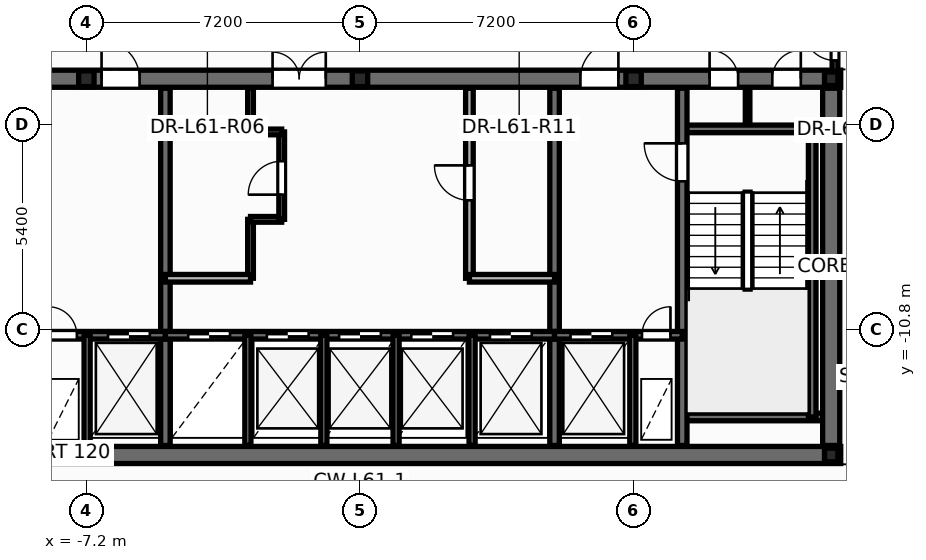
"""IFC4 building model, lengths in metres.
Left out: names, types, materials, properties, quantities, classifications, styles, units other than length and angle.
Written with IfcOpenShell. Run it as: python <this file> out.ifc"""

import sys

from ifc_helpers import new_model, si_unit, direction, frame, frame_2d, origin, origin_2d, place, context, subcontext, project, spatial, rectangle, i_section, extrude, element, fill, save


model = new_model("IFC4")
c1 = context("Model", 3, precision=1e-05, world=origin(), true_north=direction((0.0, 1.0)))
c2 = subcontext(c1, "Body", "Model", "MODEL_VIEW")
j1 = project(units=[si_unit("LENGTHUNIT", "METRE"), si_unit("PLANEANGLEUNIT", "RADIAN")], contexts=[c1])
p1 = place(None, origin())
s1 = spatial("IfcSite", under=j1, at=p1, CompositionType="ELEMENT")
p2 = place(p1, origin())
s2 = spatial("IfcBuilding", under=s1, at=p2, CompositionType="ELEMENT")
p3 = place(p2, frame((0.0, 0.0, 233.4)))
s3 = spatial("IfcBuildingStorey", under=s2, at=p3, CompositionType="ELEMENT", Elevation=233.4)
for number, where, z_axis, x_axis in (
    (1, (12.4, -14.1, 0.0), (0.0, 0.0, 1.0), (1.0, 0.0, 0.0)),
    (2, (12.4, -4.2, 0.0), (0.0, 0.0, 1.0), (1.0, 0.0, 0.0)),
):
    element("IfcColumn", number, at=place(p3, frame(where, z_axis=z_axis, x_axis=x_axis)), inside=s3, PredefinedType="COLUMN", context=c2, shape_type="SweptSolid", body=[
        extrude(i_section(OverallWidth=0.352, OverallDepth=0.359, WebThickness=0.018, FlangeThickness=0.026, at=origin_2d()), origin(), (0.0, 0.0, 1.0), 3.6),
    ])
for number, where, z_axis, x_axis in (
    (3, (-7.2, -4.2, 0.0), (0.0, 0.0, 1.0), (1.0, 0.0, 0.0)),
    (4, (0.0, -4.2, 0.0), (0.0, 0.0, 1.0), (1.0, 0.0, 0.0)),
    (5, (7.2, -4.2, 0.0), (0.0, 0.0, 1.0), (1.0, 0.0, 0.0)),
):
    element("IfcColumn", number, at=place(p3, frame(where, z_axis=z_axis, x_axis=x_axis)), inside=s3, PredefinedType="PILASTER", context=c2, shape_type="SweptSolid", body=[
        extrude(i_section(OverallWidth=0.405, OverallDepth=0.414, WebThickness=0.022, FlangeThickness=0.032, at=origin_2d()), origin(), (0.0, 0.0, 1.0), 3.6),
    ])
p4 = place(p3, frame((-2.88, -9.45, 0.0), z_axis=(0.0, 0.0, 1.0), x_axis=(0.0, 1.0, 0.0)))
e6 = element("IfcWall", 6, at=p4, inside=s3, PredefinedType="PARTITIONING", context=c2, shape_type="SweptSolid", body=[
    extrude(rectangle(XDim=1.55, YDim=0.15, at=frame_2d((0.775, 0.0))), origin(), (0.0, 0.0, 1.0), 3.345),
])
p5 = place(p3, frame((-2.88, -7.9, 0.0), z_axis=(0.0, 0.0, 1.0), x_axis=(1.0, 0.0, 0.0)))
e7 = element("IfcWall", 7, at=p5, inside=s3, PredefinedType="PARTITIONING", context=c2, shape_type="SweptSolid", body=[
    extrude(rectangle(XDim=0.82, YDim=0.15, at=frame_2d((0.41, 0.0))), origin(), (0.0, 0.0, 1.0), 3.345),
])
p6 = place(p3, frame((-2.06, -7.9, 0.0), z_axis=(0.0, 0.0, 1.0), x_axis=(0.0, 1.0, 0.0)))
e8 = element("IfcWall", 8, at=p6, inside=s3, PredefinedType="PARTITIONING", context=c2, shape_type="SweptSolid", body=[
    extrude(rectangle(XDim=2.3, YDim=0.15, at=frame_2d((1.15, 0.0))), origin(), (0.0, 0.0, 1.0), 3.345),
])
p7 = place(p6, frame((0.65, 0.0, 0.0)))
e9 = element("IfcOpeningElement", 9, at=p7, cuts=e8, PredefinedType="OPENING", context=c2, shape_type="SweptSolid", body=[
    extrude(rectangle(XDim=0.886, YDim=2.104, at=frame_2d((0.44, 1.052))), frame((0.0, 0.085, 0.0), z_axis=(0.0, -1.0, 0.0), x_axis=(1.0, 0.0, 0.0)), (0.0, 0.0, 1.0), 0.17),
])
p8 = place(p3, frame((-2.88, -5.6, 0.0), z_axis=(0.0, 0.0, 1.0), x_axis=(1.0, 0.0, 0.0)))
e10 = element("IfcWall", 10, at=p8, inside=s3, PredefinedType="PARTITIONING", context=c2, shape_type="SweptSolid", body=[
    extrude(rectangle(XDim=0.82, YDim=0.15, at=frame_2d((0.41, 0.0))), origin(), (0.0, 0.0, 1.0), 3.345),
])
p9 = place(p3, frame((-2.88, -5.6, 0.0), z_axis=(0.0, 0.0, 1.0), x_axis=(0.0, 1.0, 0.0)))
e11 = element("IfcWall", 11, at=p9, inside=s3, PredefinedType="PARTITIONING", context=c2, shape_type="SweptSolid", body=[
    extrude(rectangle(XDim=1.15, YDim=0.15, at=frame_2d((0.575, 0.0))), origin(), (0.0, 0.0, 1.0), 3.345),
])
p10 = place(p3, frame((10.2, -5.52, 0.0), z_axis=(0.0, 0.0, 1.0), x_axis=(0.0, 1.0, 0.0)))
e12 = element("IfcWall", 12, at=p10, inside=s3, PredefinedType="PARTITIONING", context=c2, shape_type="SweptSolid", body=[
    extrude(rectangle(XDim=1.12, YDim=0.12, at=frame_2d((0.56, 0.0))), origin(), (0.0, 0.0, 1.0), 3.345),
])
p11 = place(p3, frame((-12.65, -14.1, 0.0), z_axis=(0.0, 0.0, 1.0), x_axis=(1.0, 0.0, 0.0)))
e13 = element("IfcWall", 13, at=p11, inside=s3, PredefinedType="SHEAR", context=c2, shape_type="SweptSolid", body=[
    extrude(rectangle(XDim=25.3, YDim=0.45, at=frame_2d((12.65, 0.0))), origin(), (0.0, 0.0, 1.0), 3.6),
])
p12 = place(p3, frame((-12.65, -4.2, 0.0), z_axis=(0.0, 0.0, 1.0), x_axis=(1.0, 0.0, 0.0)))
e14 = element("IfcWall", 14, at=p12, inside=s3, PredefinedType="SHEAR", context=c2, shape_type="SweptSolid", body=[
    extrude(rectangle(XDim=25.3, YDim=0.45, at=frame_2d((12.65, 0.0))), origin(), (0.0, 0.0, 1.0), 3.6),
])
p13 = place(p12, frame((1.85, 0.0, 0.0)))
e15 = element("IfcOpeningElement", 15, at=p13, cuts=e14, PredefinedType="OPENING", context=c2, shape_type="SweptSolid", body=[
    extrude(rectangle(XDim=0.756, YDim=2.054, at=frame_2d((0.375, 1.027))), frame((0.0, 0.235, 0.0), z_axis=(0.0, -1.0, 0.0), x_axis=(1.0, 0.0, 0.0)), (0.0, 0.0, 1.0), 0.47),
])
p14 = place(p12, frame((21.85, 0.0, 0.0)))
e16 = element("IfcOpeningElement", 16, at=p14, cuts=e14, PredefinedType="OPENING", context=c2, shape_type="SweptSolid", body=[
    extrude(rectangle(XDim=0.756, YDim=2.054, at=frame_2d((0.375, 1.027))), frame((0.0, 0.235, 0.0), z_axis=(0.0, -1.0, 0.0), x_axis=(1.0, 0.0, 0.0)), (0.0, 0.0, 1.0), 0.47),
])
p15 = place(p12, frame((23.5, 0.0, 0.0)))
e17 = element("IfcOpeningElement", 17, at=p15, cuts=e14, PredefinedType="OPENING", context=c2, shape_type="SweptSolid", body=[
    extrude(rectangle(XDim=0.756, YDim=2.054, at=frame_2d((0.375, 1.027))), frame((0.0, 0.235, 0.0), z_axis=(0.0, -1.0, 0.0), x_axis=(1.0, 0.0, 0.0)), (0.0, 0.0, 1.0), 0.47),
])
p16 = place(p12, frame((5.85, 0.0, 0.0)))
e18 = element("IfcOpeningElement", 18, at=p16, cuts=e14, PredefinedType="OPENING", context=c2, shape_type="SweptSolid", body=[
    extrude(rectangle(XDim=1.006, YDim=2.104, at=frame_2d((0.5, 1.052))), frame((0.0, 0.235, 0.0), z_axis=(0.0, -1.0, 0.0), x_axis=(1.0, 0.0, 0.0)), (0.0, 0.0, 1.0), 0.47),
])
p17 = place(p12, frame((10.35, 0.0, 0.0)))
e19 = element("IfcOpeningElement", 19, at=p17, cuts=e14, PredefinedType="OPENING", context=c2, shape_type="SweptSolid", body=[
    extrude(rectangle(XDim=1.406, YDim=2.154, at=frame_2d((0.7, 1.077))), frame((0.0, 0.235, 0.0), z_axis=(0.0, -1.0, 0.0), x_axis=(1.0, 0.0, 0.0)), (0.0, 0.0, 1.0), 0.47),
])
p18 = place(p12, frame((18.45, 0.0, 0.0)))
e20 = element("IfcOpeningElement", 20, at=p18, cuts=e14, PredefinedType="OPENING", context=c2, shape_type="SweptSolid", body=[
    extrude(rectangle(XDim=1.006, YDim=2.104, at=frame_2d((0.5, 1.052))), frame((0.0, 0.235, 0.0), z_axis=(0.0, -1.0, 0.0), x_axis=(1.0, 0.0, 0.0)), (0.0, 0.0, 1.0), 0.47),
])
for number, where, z_axis, x_axis in (
    (21, (8.48, -5.52, 0.0), (0.0, 0.0, 1.0), (1.0, 0.0, 0.0)),
    (22, (8.48, -13.1, 0.0), (0.0, 0.0, 1.0), (1.0, 0.0, 0.0)),
):
    element("IfcWall", number, at=place(p3, frame(where, z_axis=z_axis, x_axis=x_axis)), inside=s3, PredefinedType="SOLIDWALL", context=c2, shape_type="SweptSolid", body=[
        extrude(rectangle(XDim=3.87, YDim=0.2, at=frame_2d((1.935, 0.0))), origin(), (0.0, 0.0, 1.0), 3.6),
    ])
p19 = place(p3, frame((11.9, -13.1, 0.0), z_axis=(0.0, 0.0, 1.0), x_axis=(0.0, 1.0, 0.0)))
e23 = element("IfcWall", 23, at=p19, inside=s3, PredefinedType="SOLIDWALL", context=c2, shape_type="SweptSolid", body=[
    extrude(rectangle(XDim=7.58, YDim=0.2, at=frame_2d((3.79, 0.0))), origin(), (0.0, 0.0, 1.0), 3.6),
])
p20 = place(p3, frame((8.48, -13.85, 0.0), z_axis=(0.0, 0.0, 1.0), x_axis=(0.0, 1.0, 0.0)))
e24 = element("IfcWall", 24, at=p20, inside=s3, PredefinedType="SHEAR", context=c2, shape_type="SweptSolid", body=[
    extrude(rectangle(XDim=9.4, YDim=0.25, at=frame_2d((4.7, 0.0))), origin(), (0.0, 0.0, 1.0), 3.6),
])
p21 = place(p20, frame((6.95, 0.0, 0.0)))
e25 = element("IfcOpeningElement", 25, at=p21, cuts=e24, PredefinedType="OPENING", context=c2, shape_type="SweptSolid", body=[
    extrude(rectangle(XDim=1.006, YDim=2.104, at=frame_2d((0.5, 1.052))), frame((0.0, 0.135, 0.0), z_axis=(0.0, -1.0, 0.0), x_axis=(1.0, 0.0, 0.0)), (0.0, 0.0, 1.0), 0.27),
])
for number, where, z_axis, x_axis in (
    (26, (-5.12, -13.85, 0.0), (0.0, 0.0, 1.0), (0.0, 1.0, 0.0)),
    (27, (5.12, -13.85, 0.0), (0.0, 0.0, 1.0), (0.0, 1.0, 0.0)),
):
    element("IfcWall", number, at=place(p3, frame(where, z_axis=z_axis, x_axis=x_axis)), inside=s3, PredefinedType="SHEAR", context=c2, shape_type="SweptSolid", body=[
        extrude(rectangle(XDim=9.4, YDim=0.25, at=frame_2d((4.7, 0.0))), origin(), (0.0, 0.0, 1.0), 3.6),
    ])
p22 = place(p3, frame((-8.48, -10.95, 0.0), z_axis=(0.0, 0.0, 1.0), x_axis=(1.0, 0.0, 0.0)))
e28 = element("IfcWall", 28, at=p22, inside=s3, PredefinedType="SOLIDWALL", context=c2, shape_type="SweptSolid", body=[
    extrude(rectangle(XDim=3.36, YDim=0.2, at=frame_2d((1.68, 0.0))), origin(), (0.0, 0.0, 1.0), 3.6),
])
p23 = place(p22, frame((0.28, 0.0, 0.0)))
e29 = element("IfcOpeningElement", 29, at=p23, cuts=e28, PredefinedType="OPENING", context=c2, shape_type="SweptSolid", body=[
    extrude(rectangle(XDim=0.756, YDim=2.054, at=frame_2d((0.375, 1.027))), frame((0.0, 0.11, 0.0), z_axis=(0.0, -1.0, 0.0), x_axis=(1.0, 0.0, 0.0)), (0.0, 0.0, 1.0), 0.22),
])
p24 = place(p22, frame((1.85, 0.0, 0.0)))
e30 = element("IfcOpeningElement", 30, at=p24, cuts=e28, PredefinedType="OPENING", context=c2, shape_type="SweptSolid", body=[
    extrude(rectangle(XDim=1.106, YDim=2.104, at=frame_2d((0.55, 1.052))), frame((0.0, 0.11, 0.0), z_axis=(0.0, -1.0, 0.0), x_axis=(1.0, 0.0, 0.0)), (0.0, 0.0, 1.0), 0.22),
])
p25 = place(p3, frame((-5.12, -10.95, 0.0), z_axis=(0.0, 0.0, 1.0), x_axis=(1.0, 0.0, 0.0)))
e31 = element("IfcWall", 31, at=p25, inside=s3, PredefinedType="SOLIDWALL", context=c2, shape_type="SweptSolid", body=[
    extrude(rectangle(XDim=10.24, YDim=0.2, at=frame_2d((5.12, 0.0))), origin(), (0.0, 0.0, 1.0), 3.6),
])
p26 = place(p25, frame((0.6, 0.0, 0.0)))
e32 = element("IfcOpeningElement", 32, at=p26, cuts=e31, PredefinedType="OPENING", context=c2, shape_type="SweptSolid", body=[
    extrude(rectangle(XDim=1.106, YDim=2.104, at=frame_2d((0.55, 1.052))), frame((0.0, 0.11, 0.0), z_axis=(0.0, -1.0, 0.0), x_axis=(1.0, 0.0, 0.0)), (0.0, 0.0, 1.0), 0.22),
])
p27 = place(p25, frame((2.67, 0.0, 0.0)))
e33 = element("IfcOpeningElement", 33, at=p27, cuts=e31, PredefinedType="OPENING", context=c2, shape_type="SweptSolid", body=[
    extrude(rectangle(XDim=1.106, YDim=2.104, at=frame_2d((0.55, 1.052))), frame((0.0, 0.11, 0.0), z_axis=(0.0, -1.0, 0.0), x_axis=(1.0, 0.0, 0.0)), (0.0, 0.0, 1.0), 0.22),
])
p28 = place(p25, frame((4.57, 0.0, 0.0)))
e34 = element("IfcOpeningElement", 34, at=p28, cuts=e31, PredefinedType="OPENING", context=c2, shape_type="SweptSolid", body=[
    extrude(rectangle(XDim=1.106, YDim=2.104, at=frame_2d((0.55, 1.052))), frame((0.0, 0.11, 0.0), z_axis=(0.0, -1.0, 0.0), x_axis=(1.0, 0.0, 0.0)), (0.0, 0.0, 1.0), 0.22),
])
p29 = place(p25, frame((6.47, 0.0, 0.0)))
e35 = element("IfcOpeningElement", 35, at=p29, cuts=e31, PredefinedType="OPENING", context=c2, shape_type="SweptSolid", body=[
    extrude(rectangle(XDim=1.106, YDim=2.104, at=frame_2d((0.55, 1.052))), frame((0.0, 0.11, 0.0), z_axis=(0.0, -1.0, 0.0), x_axis=(1.0, 0.0, 0.0)), (0.0, 0.0, 1.0), 0.22),
])
p30 = place(p25, frame((8.54, 0.0, 0.0)))
e36 = element("IfcOpeningElement", 36, at=p30, cuts=e31, PredefinedType="OPENING", context=c2, shape_type="SweptSolid", body=[
    extrude(rectangle(XDim=1.106, YDim=2.104, at=frame_2d((0.55, 1.052))), frame((0.0, 0.11, 0.0), z_axis=(0.0, -1.0, 0.0), x_axis=(1.0, 0.0, 0.0)), (0.0, 0.0, 1.0), 0.22),
])
p31 = place(p3, frame((5.12, -10.95, 0.0), z_axis=(0.0, 0.0, 1.0), x_axis=(1.0, 0.0, 0.0)))
e37 = element("IfcWall", 37, at=p31, inside=s3, PredefinedType="SOLIDWALL", context=c2, shape_type="SweptSolid", body=[
    extrude(rectangle(XDim=3.36, YDim=0.2, at=frame_2d((1.68, 0.0))), origin(), (0.0, 0.0, 1.0), 3.6),
])
p32 = place(p31, frame((0.42, 0.0, 0.0)))
e38 = element("IfcOpeningElement", 38, at=p32, cuts=e37, PredefinedType="OPENING", context=c2, shape_type="SweptSolid", body=[
    extrude(rectangle(XDim=1.106, YDim=2.104, at=frame_2d((0.55, 1.052))), frame((0.0, 0.11, 0.0), z_axis=(0.0, -1.0, 0.0), x_axis=(1.0, 0.0, 0.0)), (0.0, 0.0, 1.0), 0.22),
])
p33 = place(p31, frame((2.3, 0.0, 0.0)))
e39 = element("IfcOpeningElement", 39, at=p33, cuts=e37, PredefinedType="OPENING", context=c2, shape_type="SweptSolid", body=[
    extrude(rectangle(XDim=0.756, YDim=2.054, at=frame_2d((0.375, 1.027))), frame((0.0, 0.11, 0.0), z_axis=(0.0, -1.0, 0.0), x_axis=(1.0, 0.0, 0.0)), (0.0, 0.0, 1.0), 0.22),
])
for number, where, z_axis, x_axis in (
    (40, (-7.18, -13.85, 0.0), (0.0, 0.0, 1.0), (0.0, 1.0, 0.0)),
    (41, (7.18, -13.85, 0.0), (0.0, 0.0, 1.0), (0.0, 1.0, 0.0)),
    (42, (-2.95, -13.85, 0.0), (0.0, 0.0, 1.0), (0.0, 1.0, 0.0)),
    (43, (2.95, -13.85, 0.0), (0.0, 0.0, 1.0), (0.0, 1.0, 0.0)),
):
    element("IfcWall", number, at=place(p3, frame(where, z_axis=z_axis, x_axis=x_axis)), inside=s3, PredefinedType="PARTITIONING", context=c2, shape_type="SweptSolid", body=[
        extrude(rectangle(XDim=2.9, YDim=0.16, at=frame_2d((1.45, 0.0))), origin(), (0.0, 0.0, 1.0), 2.57),
    ])
p34 = place(p3, frame((12.4, -13.85, 0.0), z_axis=(0.0, 0.0, 1.0), x_axis=(0.0, 1.0, 0.0)))
e44 = element("IfcWall", 44, at=p34, inside=s3, PredefinedType="SHEAR", context=c2, shape_type="SweptSolid", body=[
    extrude(rectangle(XDim=9.4, YDim=0.45, at=frame_2d((4.7, 0.0))), origin(), (0.0, 0.0, 1.0), 3.6),
])
p35 = place(p3, frame((-5.12, -9.45, 0.0), z_axis=(0.0, 0.0, 1.0), x_axis=(1.0, 0.0, 0.0)))
e45 = element("IfcWall", 45, at=p35, inside=s3, PredefinedType="SOLIDWALL", context=c2, shape_type="SweptSolid", body=[
    extrude(rectangle(XDim=2.24, YDim=0.2, at=frame_2d((1.12, 0.0))), origin(), (0.0, 0.0, 1.0), 3.345),
])
p36 = place(p3, frame((2.88, -9.45, 0.0), z_axis=(0.0, 0.0, 1.0), x_axis=(0.0, 1.0, 0.0)))
e46 = element("IfcWall", 46, at=p36, inside=s3, PredefinedType="SOLIDWALL", context=c2, shape_type="SweptSolid", body=[
    extrude(rectangle(XDim=5.0, YDim=0.2, at=frame_2d((2.5, 0.0))), origin(), (0.0, 0.0, 1.0), 3.345),
])
p37 = place(p36, frame((2.05, 0.0, 0.0)))
e47 = element("IfcOpeningElement", 47, at=p37, cuts=e46, PredefinedType="OPENING", context=c2, shape_type="SweptSolid", body=[
    extrude(rectangle(XDim=0.926, YDim=2.104, at=frame_2d((0.46, 1.052))), frame((0.0, 0.11, 0.0), z_axis=(0.0, -1.0, 0.0), x_axis=(1.0, 0.0, 0.0)), (0.0, 0.0, 1.0), 0.22),
])
p38 = place(p3, frame((2.88, -9.45, 0.0), z_axis=(0.0, 0.0, 1.0), x_axis=(1.0, 0.0, 0.0)))
e48 = element("IfcWall", 48, at=p38, inside=s3, PredefinedType="SOLIDWALL", context=c2, shape_type="SweptSolid", body=[
    extrude(rectangle(XDim=2.24, YDim=0.2, at=frame_2d((1.12, 0.0))), origin(), (0.0, 0.0, 1.0), 3.345),
])
for number, where, z_axis, x_axis in (
    (49, (-0.95, -13.85, 0.0), (0.0, 0.0, 1.0), (0.0, 1.0, 0.0)),
    (50, (0.95, -13.85, 0.0), (0.0, 0.0, 1.0), (0.0, 1.0, 0.0)),
):
    element("IfcWall", number, at=place(p3, frame(where, z_axis=z_axis, x_axis=x_axis)), inside=s3, PredefinedType="PARTITIONING", context=c2, shape_type="SweptSolid", body=[
        extrude(rectangle(XDim=2.9, YDim=0.16, at=frame_2d((1.45, 0.0))), origin(), (0.0, 0.0, 1.0), 2.57),
    ])
p39 = place(p3, frame((12.5, -4.24, 0.0), z_axis=(0.0, 0.0, 1.0), x_axis=(0.0, 1.0, 0.0)))
e51 = element("IfcWall", 51, at=p39, inside=s3, PredefinedType="PARTITIONING", context=c2, shape_type="SweptSolid", body=[
    extrude(rectangle(XDim=1.48, YDim=0.15, at=frame_2d((0.74, 0.0))), origin(), (0.0, 0.0, 1.0), 2.32),
])
p40 = place(p39, frame((0.522, 0.0, 0.0)))
e52 = element("IfcOpeningElement", 52, at=p40, cuts=e51, PredefinedType="OPENING", context=c2, shape_type="SweptSolid", body=[
    extrude(rectangle(XDim=0.826, YDim=2.104, at=frame_2d((0.41, 1.052))), frame((0.0, 0.085, 0.0), z_axis=(0.0, -1.0, 0.0), x_axis=(1.0, 0.0, 0.0)), (0.0, 0.0, 1.0), 0.17),
])
p41 = place(p7, origin())
e53 = element("IfcDoor", 53, at=p41, inside=s3, OperationType="SINGLE_SWING_LEFT", PredefinedType="DOOR", context=c2, shape_type="SweptSolid", body=[
    extrude(rectangle(XDim=0.88, YDim=2.1, at=frame_2d((0.44, 1.05))), frame((0.0, 0.025, 0.0), z_axis=(0.0, -1.0, 0.0), x_axis=(1.0, 0.0, 0.0)), (0.0, 0.0, 1.0), 0.05),
])
fill(e9, e53)
p42 = place(p37, origin())
e54 = element("IfcDoor", 54, at=p42, inside=s3, OperationType="SINGLE_SWING_RIGHT", PredefinedType="DOOR", context=c2, shape_type="SweptSolid", body=[
    extrude(rectangle(XDim=0.92, YDim=2.1, at=frame_2d((0.46, 1.05))), frame((0.0, 0.025, 0.0), z_axis=(0.0, -1.0, 0.0), x_axis=(1.0, 0.0, 0.0)), (0.0, 0.0, 1.0), 0.05),
])
fill(e47, e54)
p43 = place(p21, origin())
e55 = element("IfcDoor", 55, at=p43, inside=s3, OperationType="SINGLE_SWING_RIGHT", PredefinedType="DOOR", context=c2, shape_type="SweptSolid", body=[
    extrude(rectangle(XDim=1.0, YDim=2.1, at=frame_2d((0.5, 1.05))), frame((0.0, 0.025, 0.0), z_axis=(0.0, -1.0, 0.0), x_axis=(1.0, 0.0, 0.0)), (0.0, 0.0, 1.0), 0.05),
])
fill(e25, e55)
p44 = place(p23, origin())
e56 = element("IfcDoor", 56, at=p44, inside=s3, OperationType="SINGLE_SWING_LEFT", PredefinedType="DOOR", context=c2, shape_type="SweptSolid", body=[
    extrude(rectangle(XDim=0.75, YDim=2.05, at=frame_2d((0.375, 1.025))), frame((0.0, 0.025, 0.0), z_axis=(0.0, -1.0, 0.0), x_axis=(1.0, 0.0, 0.0)), (0.0, 0.0, 1.0), 0.05),
])
fill(e29, e56)
p45 = place(p24, origin())
e57 = element("IfcDoor", 57, at=p45, inside=s3, OperationType="DOUBLE_DOOR_SLIDING", PredefinedType="DOOR", context=c2, shape_type="SweptSolid", body=[
    extrude(rectangle(XDim=1.1, YDim=2.1, at=frame_2d((0.55, 1.05))), frame((0.0, 0.025, 0.0), z_axis=(0.0, -1.0, 0.0), x_axis=(1.0, 0.0, 0.0)), (0.0, 0.0, 1.0), 0.05),
])
fill(e30, e57)
p46 = place(p32, origin())
e58 = element("IfcDoor", 58, at=p46, inside=s3, OperationType="DOUBLE_DOOR_SLIDING", PredefinedType="DOOR", context=c2, shape_type="SweptSolid", body=[
    extrude(rectangle(XDim=1.1, YDim=2.1, at=frame_2d((0.55, 1.05))), frame((0.0, 0.025, 0.0), z_axis=(0.0, -1.0, 0.0), x_axis=(1.0, 0.0, 0.0)), (0.0, 0.0, 1.0), 0.05),
])
fill(e38, e58)
p47 = place(p33, origin())
e59 = element("IfcDoor", 59, at=p47, inside=s3, OperationType="SINGLE_SWING_RIGHT", PredefinedType="DOOR", context=c2, shape_type="SweptSolid", body=[
    extrude(rectangle(XDim=0.75, YDim=2.05, at=frame_2d((0.375, 1.025))), frame((0.0, 0.025, 0.0), z_axis=(0.0, -1.0, 0.0), x_axis=(1.0, 0.0, 0.0)), (0.0, 0.0, 1.0), 0.05),
])
fill(e39, e59)
p48 = place(p26, origin())
e60 = element("IfcDoor", 60, at=p48, inside=s3, OperationType="DOUBLE_DOOR_SLIDING", PredefinedType="DOOR", context=c2, shape_type="SweptSolid", body=[
    extrude(rectangle(XDim=1.1, YDim=2.1, at=frame_2d((0.55, 1.05))), frame((0.0, 0.025, 0.0), z_axis=(0.0, -1.0, 0.0), x_axis=(1.0, 0.0, 0.0)), (0.0, 0.0, 1.0), 0.05),
])
fill(e32, e60)
p49 = place(p27, origin())
e61 = element("IfcDoor", 61, at=p49, inside=s3, OperationType="DOUBLE_DOOR_SLIDING", PredefinedType="DOOR", context=c2, shape_type="SweptSolid", body=[
    extrude(rectangle(XDim=1.1, YDim=2.1, at=frame_2d((0.55, 1.05))), frame((0.0, 0.025, 0.0), z_axis=(0.0, -1.0, 0.0), x_axis=(1.0, 0.0, 0.0)), (0.0, 0.0, 1.0), 0.05),
])
fill(e33, e61)
p50 = place(p28, origin())
e62 = element("IfcDoor", 62, at=p50, inside=s3, OperationType="DOUBLE_DOOR_SLIDING", PredefinedType="DOOR", context=c2, shape_type="SweptSolid", body=[
    extrude(rectangle(XDim=1.1, YDim=2.1, at=frame_2d((0.55, 1.05))), frame((0.0, 0.025, 0.0), z_axis=(0.0, -1.0, 0.0), x_axis=(1.0, 0.0, 0.0)), (0.0, 0.0, 1.0), 0.05),
])
fill(e34, e62)
p51 = place(p29, origin())
e63 = element("IfcDoor", 63, at=p51, inside=s3, OperationType="DOUBLE_DOOR_SLIDING", PredefinedType="DOOR", context=c2, shape_type="SweptSolid", body=[
    extrude(rectangle(XDim=1.1, YDim=2.1, at=frame_2d((0.55, 1.05))), frame((0.0, 0.025, 0.0), z_axis=(0.0, -1.0, 0.0), x_axis=(1.0, 0.0, 0.0)), (0.0, 0.0, 1.0), 0.05),
])
fill(e35, e63)
p52 = place(p30, origin())
e64 = element("IfcDoor", 64, at=p52, inside=s3, OperationType="DOUBLE_DOOR_SLIDING", PredefinedType="DOOR", context=c2, shape_type="SweptSolid", body=[
    extrude(rectangle(XDim=1.1, YDim=2.1, at=frame_2d((0.55, 1.05))), frame((0.0, 0.025, 0.0), z_axis=(0.0, -1.0, 0.0), x_axis=(1.0, 0.0, 0.0)), (0.0, 0.0, 1.0), 0.05),
])
fill(e36, e64)
p53 = place(p14, origin())
e65 = element("IfcDoor", 65, at=p53, inside=s3, OperationType="SINGLE_SWING_LEFT", PredefinedType="DOOR", context=c2, shape_type="SweptSolid", body=[
    extrude(rectangle(XDim=0.75, YDim=2.05, at=frame_2d((0.375, 1.025))), frame((0.0, 0.025, 0.0), z_axis=(0.0, -1.0, 0.0), x_axis=(1.0, 0.0, 0.0)), (0.0, 0.0, 1.0), 0.05),
])
fill(e16, e65)
p54 = place(p15, origin())
e66 = element("IfcDoor", 66, at=p54, inside=s3, OperationType="SINGLE_SWING_RIGHT", PredefinedType="DOOR", context=c2, shape_type="SweptSolid", body=[
    extrude(rectangle(XDim=0.75, YDim=2.05, at=frame_2d((0.375, 1.025))), frame((0.0, 0.025, 0.0), z_axis=(0.0, -1.0, 0.0), x_axis=(1.0, 0.0, 0.0)), (0.0, 0.0, 1.0), 0.05),
])
fill(e17, e66)
p55 = place(p16, origin())
e67 = element("IfcDoor", 67, at=p55, inside=s3, OperationType="SINGLE_SWING_LEFT", PredefinedType="DOOR", context=c2, shape_type="SweptSolid", body=[
    extrude(rectangle(XDim=1.0, YDim=2.1, at=frame_2d((0.5, 1.05))), frame((0.0, 0.025, 0.0), z_axis=(0.0, -1.0, 0.0), x_axis=(1.0, 0.0, 0.0)), (0.0, 0.0, 1.0), 0.05),
])
fill(e18, e67)
p56 = place(p17, origin())
e68 = element("IfcDoor", 68, at=p56, inside=s3, OperationType="DOUBLE_DOOR_SINGLE_SWING", PredefinedType="DOOR", context=c2, shape_type="SweptSolid", body=[
    extrude(rectangle(XDim=1.4, YDim=2.15, at=frame_2d((0.7, 1.075))), frame((0.0, 0.025, 0.0), z_axis=(0.0, -1.0, 0.0), x_axis=(1.0, 0.0, 0.0)), (0.0, 0.0, 1.0), 0.05),
])
fill(e19, e68)
p57 = place(p18, origin())
e69 = element("IfcDoor", 69, at=p57, inside=s3, OperationType="SINGLE_SWING_RIGHT", PredefinedType="DOOR", context=c2, shape_type="SweptSolid", body=[
    extrude(rectangle(XDim=1.0, YDim=2.1, at=frame_2d((0.5, 1.05))), frame((0.0, 0.025, 0.0), z_axis=(0.0, -1.0, 0.0), x_axis=(1.0, 0.0, 0.0)), (0.0, 0.0, 1.0), 0.05),
])
fill(e20, e69)
p58 = place(p40, origin())
e70 = element("IfcDoor", 70, at=p58, inside=s3, OperationType="SINGLE_SWING_RIGHT", PredefinedType="DOOR", context=c2, shape_type="SweptSolid", body=[
    extrude(rectangle(XDim=0.82, YDim=2.1, at=frame_2d((0.41, 1.05))), frame((0.0, 0.025, 0.0), z_axis=(0.0, -1.0, 0.0), x_axis=(1.0, 0.0, 0.0)), (0.0, 0.0, 1.0), 0.05),
])
fill(e52, e70)
save(model, sys.argv[1])
